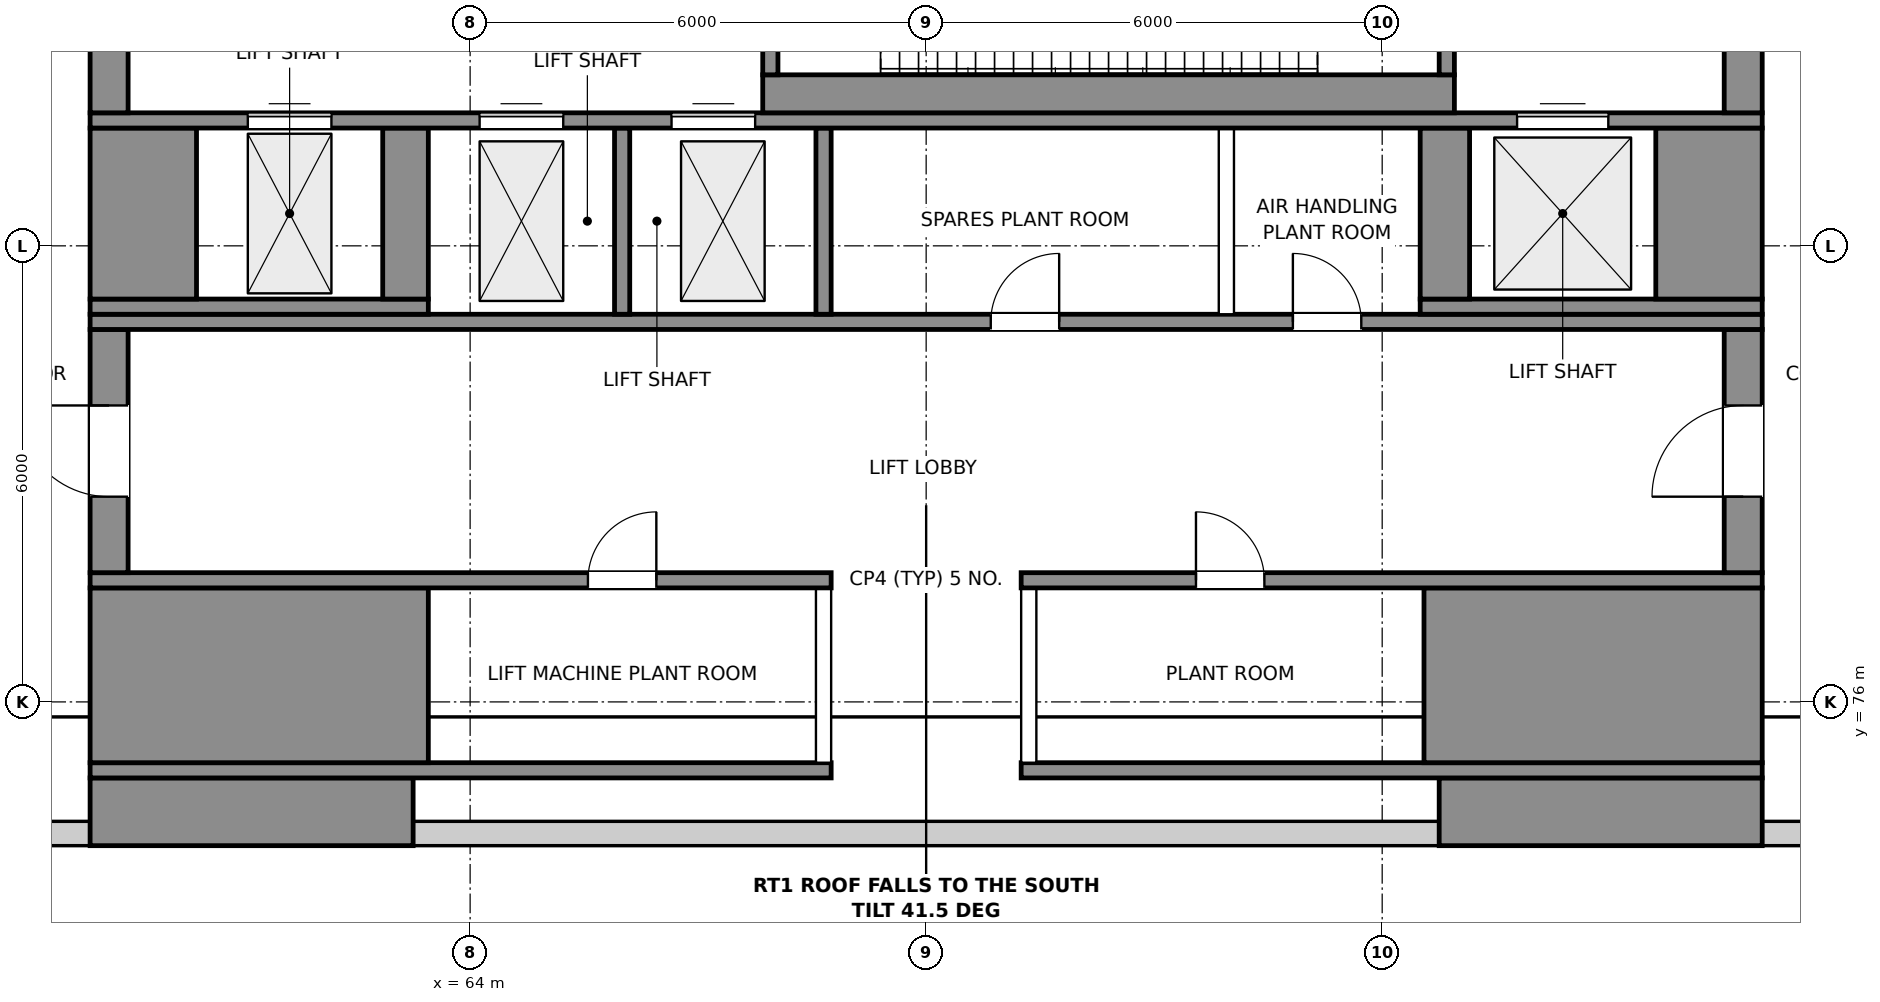
"""IFC4 building model, lengths in metres.
Left out: names, types, materials, properties, quantities, classifications, styles, units other than length and angle.
Written with IfcOpenShell. Run it as: python <this file> out.ifc"""

import sys

from ifc_helpers import new_model, si_unit, direction, frame, frame_2d, origin, place, context, subcontext, project, spatial, polyline, rectangle, outline, extrude, element, fill, save


model = new_model("IFC4")
c1 = context("Model", 3, precision=1e-05, world=origin(), true_north=direction((0.0, 1.0)))
c2 = subcontext(c1, "Body", "Model", "MODEL_VIEW")
j1 = project(units=[si_unit("LENGTHUNIT", "METRE"), si_unit("PLANEANGLEUNIT", "RADIAN")], contexts=[c1])
p1 = place(None, origin())
s1 = spatial("IfcSite", under=j1, at=p1, CompositionType="ELEMENT")
p2 = place(p1, origin())
s2 = spatial("IfcBuilding", under=s1, at=p2, CompositionType="ELEMENT")
p3 = place(p2, frame((0.0, 0.0, 346.7)))
s3 = spatial("IfcBuildingStorey", under=s2, at=p3, CompositionType="ELEMENT", Elevation=346.7)
p4 = place(p3, frame((51.716, 74.269, 0.0), z_axis=(0.0, 0.0, 1.0), x_axis=(1.0, 0.0, 0.0)))
e1 = element("IfcWall", 1, at=p4, inside=s3, PredefinedType="SOLIDWALL", context=c2, shape_type="SweptSolid", body=[
    extrude(rectangle(XDim=7.284, YDim=0.32, at=frame_2d((3.642, 0.0))), origin(), (0.0, 0.0, 1.0), 2.842),
])
p5 = place(p3, frame((63.25, 74.269, 0.0), z_axis=(0.0, 0.0, 1.0), x_axis=(1.0, 0.0, 0.0)))
e2 = element("IfcWall", 2, at=p5, inside=s3, PredefinedType="SOLIDWALL", context=c2, shape_type="SweptSolid", body=[
    extrude(rectangle(XDim=13.5, YDim=0.32, at=frame_2d((6.75, 0.0))), origin(), (0.0, 0.0, 1.0), 2.842),
])
p6 = place(p3, frame((81.0, 74.269, 0.0), z_axis=(0.0, 0.0, 1.0), x_axis=(1.0, 0.0, 0.0)))
e3 = element("IfcWall", 3, at=p6, inside=s3, PredefinedType="SOLIDWALL", context=c2, shape_type="SweptSolid", body=[
    extrude(rectangle(XDim=7.284, YDim=0.32, at=frame_2d((3.642, 0.0))), origin(), (0.0, 0.0, 1.0), 2.842),
])
for number, where, z_axis, x_axis in (
    (4, (59.0, 74.554, 0.0), (0.0, 0.0, 1.0), (1.0, 0.0, 0.0)),
    (5, (76.75, 74.554, 0.0), (0.0, 0.0, 1.0), (1.0, 0.0, 0.0)),
):
    element("IfcWall", number, at=place(p3, frame(where, z_axis=z_axis, x_axis=x_axis)), inside=s3, PredefinedType="SHEAR", context=c2, shape_type="SweptSolid", body=[
        extrude(rectangle(XDim=4.25, YDim=0.891, at=frame_2d((2.125, 0.0))), origin(), (0.0, 0.0, 1.0), 3.045),
    ])
for number, where, z_axis, x_axis in (
    (6, (59.0, 75.1, 0.0), (0.0, 0.0, 1.0), (1.0, 0.0, 0.0)),
    (7, (71.25, 75.1, 0.0), (0.0, 0.0, 1.0), (1.0, 0.0, 0.0)),
):
    element("IfcWall", number, at=place(p3, frame(where, z_axis=z_axis, x_axis=x_axis)), inside=s3, PredefinedType="SHEAR", context=c2, shape_type="SweptSolid", body=[
        extrude(rectangle(XDim=9.75, YDim=0.2, at=frame_2d((4.875, 0.0))), origin(), (0.0, 0.0, 1.0), 3.528),
    ])
p7 = place(p3, frame((59.0, 76.35, 0.0), z_axis=(0.0, 0.0, 1.0), x_axis=(1.0, 0.0, 0.0)))
e8 = element("IfcWall", 8, at=p7, inside=s3, PredefinedType="SHEAR", context=c2, shape_type="SweptSolid", body=[
    extrude(rectangle(XDim=4.45, YDim=2.3, at=frame_2d((2.225, 0.0))), origin(), (0.0, 0.0, 1.0), 4.5),
])
for number, where, z_axis, x_axis in (
    (9, (68.65, 75.2, 0.0), (0.0, 0.0, 1.0), (0.0, 1.0, 0.0)),
    (10, (71.35, 75.2, 0.0), (0.0, 0.0, 1.0), (0.0, 1.0, 0.0)),
):
    element("IfcWall", number, at=place(p3, frame(where, z_axis=z_axis, x_axis=x_axis)), inside=s3, PredefinedType="PARTITIONING", context=c2, shape_type="SweptSolid", body=[
        extrude(outline(polyline([(0.0, 0.0), (2.3, 0.0), (2.3, 4.2), (0.0, 3.516), (0.0, 0.0)])), frame((0.0, 0.1, 0.0), z_axis=(0.0, -1.0, 0.0), x_axis=(1.0, 0.0, 0.0)), (0.0, 0.0, 1.0), 0.2),
    ])
p8 = place(p3, frame((76.55, 76.35, 0.0), z_axis=(0.0, 0.0, 1.0), x_axis=(1.0, 0.0, 0.0)))
e11 = element("IfcWall", 11, at=p8, inside=s3, PredefinedType="SHEAR", context=c2, shape_type="SweptSolid", body=[
    extrude(rectangle(XDim=4.45, YDim=2.3, at=frame_2d((2.225, 0.0))), origin(), (0.0, 0.0, 1.0), 4.5),
])
p9 = place(p3, frame((59.0, 77.6, 0.0), z_axis=(0.0, 0.0, 1.0), x_axis=(1.0, 0.0, 0.0)))
e12 = element("IfcWall", 12, at=p9, inside=s3, PredefinedType="SHEAR", context=c2, shape_type="SweptSolid", body=[
    extrude(rectangle(XDim=9.75, YDim=0.2, at=frame_2d((4.875, 0.0))), origin(), (0.0, 0.0, 1.0), 4.5),
])
p10 = place(p9, frame((6.55, 0.0, 0.0)))
e13 = element("IfcOpeningElement", 13, at=p10, cuts=e12, PredefinedType="OPENING", context=c2, shape_type="SweptSolid", body=[
    extrude(rectangle(XDim=0.9, YDim=2.1, at=frame_2d((0.45, 1.05))), frame((0.0, 0.11, 0.0), z_axis=(0.0, -1.0, 0.0), x_axis=(1.0, 0.0, 0.0)), (0.0, 0.0, 1.0), 0.22),
])
p11 = place(p3, frame((71.25, 77.6, 0.0), z_axis=(0.0, 0.0, 1.0), x_axis=(1.0, 0.0, 0.0)))
e14 = element("IfcWall", 14, at=p11, inside=s3, PredefinedType="SHEAR", context=c2, shape_type="SweptSolid", body=[
    extrude(rectangle(XDim=9.75, YDim=0.2, at=frame_2d((4.875, 0.0))), origin(), (0.0, 0.0, 1.0), 4.5),
])
p12 = place(p11, frame((2.3, 0.0, 0.0)))
e15 = element("IfcOpeningElement", 15, at=p12, cuts=e14, PredefinedType="OPENING", context=c2, shape_type="SweptSolid", body=[
    extrude(rectangle(XDim=0.9, YDim=2.1, at=frame_2d((0.45, 1.05))), frame((0.0, 0.11, 0.0), z_axis=(0.0, -1.0, 0.0), x_axis=(1.0, 0.0, 0.0)), (0.0, 0.0, 1.0), 0.22),
])
p13 = place(p3, frame((59.25, 77.7, 0.0), z_axis=(0.0, 0.0, 1.0), x_axis=(0.0, 1.0, 0.0)))
e16 = element("IfcWall", 16, at=p13, inside=s3, PredefinedType="SHEAR", context=c2, shape_type="SweptSolid", body=[
    extrude(rectangle(XDim=3.2, YDim=0.5, at=frame_2d((1.6, 0.0))), origin(), (0.0, 0.0, 1.0), 4.5),
])
p14 = place(p13, frame((1.0, 0.0, 0.0)))
e17 = element("IfcOpeningElement", 17, at=p14, cuts=e16, PredefinedType="OPENING", context=c2, shape_type="SweptSolid", body=[
    extrude(rectangle(XDim=1.2, YDim=2.1, at=frame_2d((0.6, 1.05))), frame((0.0, 0.26, 0.0), z_axis=(0.0, -1.0, 0.0), x_axis=(1.0, 0.0, 0.0)), (0.0, 0.0, 1.0), 0.52),
])
p15 = place(p3, frame((80.75, 77.7, 0.0), z_axis=(0.0, 0.0, 1.0), x_axis=(0.0, 1.0, 0.0)))
e18 = element("IfcWall", 18, at=p15, inside=s3, PredefinedType="SHEAR", context=c2, shape_type="SweptSolid", body=[
    extrude(rectangle(XDim=3.2, YDim=0.5, at=frame_2d((1.6, 0.0))), origin(), (0.0, 0.0, 1.0), 4.5),
])
p16 = place(p15, frame((1.0, 0.0, 0.0)))
e19 = element("IfcOpeningElement", 19, at=p16, cuts=e18, PredefinedType="OPENING", context=c2, shape_type="SweptSolid", body=[
    extrude(rectangle(XDim=1.2, YDim=2.1, at=frame_2d((0.6, 1.05))), frame((0.0, 0.26, 0.0), z_axis=(0.0, -1.0, 0.0), x_axis=(1.0, 0.0, 0.0)), (0.0, 0.0, 1.0), 0.52),
])
p17 = place(p3, frame((59.0, 81.0, 0.0), z_axis=(0.0, 0.0, 1.0), x_axis=(1.0, 0.0, 0.0)))
e20 = element("IfcWall", 20, at=p17, inside=s3, PredefinedType="SHEAR", context=c2, shape_type="SweptSolid", body=[
    extrude(rectangle(XDim=22.0, YDim=0.2, at=frame_2d((11.0, 0.0))), origin(), (0.0, 0.0, 1.0), 4.5),
])
p18 = place(p17, frame((11.85, 0.0, 0.0)))
e21 = element("IfcOpeningElement", 21, at=p18, cuts=e20, PredefinedType="OPENING", context=c2, shape_type="SweptSolid", body=[
    extrude(rectangle(XDim=0.9, YDim=2.1, at=frame_2d((0.45, 1.05))), frame((0.0, 0.11, 0.0), z_axis=(0.0, -1.0, 0.0), x_axis=(1.0, 0.0, 0.0)), (0.0, 0.0, 1.0), 0.22),
])
p19 = place(p17, frame((15.825, 0.0, 0.0)))
e22 = element("IfcOpeningElement", 22, at=p19, cuts=e20, PredefinedType="OPENING", context=c2, shape_type="SweptSolid", body=[
    extrude(rectangle(XDim=0.9, YDim=2.1, at=frame_2d((0.45, 1.05))), frame((0.0, 0.11, 0.0), z_axis=(0.0, -1.0, 0.0), x_axis=(1.0, 0.0, 0.0)), (0.0, 0.0, 1.0), 0.22),
])
p20 = place(p3, frame((59.0, 81.2, 0.0), z_axis=(0.0, 0.0, 1.0), x_axis=(1.0, 0.0, 0.0)))
e23 = element("IfcWall", 23, at=p20, inside=s3, PredefinedType="SHEAR", context=c2, shape_type="SweptSolid", body=[
    extrude(rectangle(XDim=4.45, YDim=0.2, at=frame_2d((2.225, 0.0))), origin(), (0.0, 0.0, 1.0), 4.5),
])
for number, where, z_axis, x_axis in (
    (24, (66.0, 81.1, 0.0), (0.0, 0.0, 1.0), (0.0, 1.0, 0.0)),
    (25, (68.65, 81.1, 0.0), (0.0, 0.0, 1.0), (0.0, 1.0, 0.0)),
):
    element("IfcWall", number, at=place(p3, frame(where, z_axis=z_axis, x_axis=x_axis)), inside=s3, PredefinedType="SHEAR", context=c2, shape_type="SweptSolid", body=[
        extrude(rectangle(XDim=2.45, YDim=0.2, at=frame_2d((1.225, 0.0))), origin(), (0.0, 0.0, 1.0), 4.5),
    ])
p21 = place(p3, frame((73.95, 81.1, 0.0), z_axis=(0.0, 0.0, 1.0), x_axis=(0.0, 1.0, 0.0)))
e26 = element("IfcWall", 26, at=p21, inside=s3, PredefinedType="PARTITIONING", context=c2, shape_type="SweptSolid", body=[
    extrude(rectangle(XDim=2.45, YDim=0.2, at=frame_2d((1.225, 0.0))), origin(), (0.0, 0.0, 1.0), 4.2),
])
p22 = place(p3, frame((76.5, 81.2, 0.0), z_axis=(0.0, 0.0, 1.0), x_axis=(1.0, 0.0, 0.0)))
e27 = element("IfcWall", 27, at=p22, inside=s3, PredefinedType="SHEAR", context=c2, shape_type="SweptSolid", body=[
    extrude(rectangle(XDim=4.5, YDim=0.2, at=frame_2d((2.25, 0.0))), origin(), (0.0, 0.0, 1.0), 4.5),
])
p23 = place(p3, frame((59.7, 81.3, 0.0), z_axis=(0.0, 0.0, 1.0), x_axis=(0.0, 1.0, 0.0)))
e28 = element("IfcWall", 28, at=p23, inside=s3, PredefinedType="SHEAR", context=c2, shape_type="SweptSolid", body=[
    extrude(rectangle(XDim=2.25, YDim=1.4, at=frame_2d((1.125, 0.0))), origin(), (0.0, 0.0, 1.0), 4.5),
])
p24 = place(p3, frame((63.15, 81.3, 0.0), z_axis=(0.0, 0.0, 1.0), x_axis=(0.0, 1.0, 0.0)))
e29 = element("IfcWall", 29, at=p24, inside=s3, PredefinedType="SHEAR", context=c2, shape_type="SweptSolid", body=[
    extrude(rectangle(XDim=2.25, YDim=0.6, at=frame_2d((1.125, 0.0))), origin(), (0.0, 0.0, 1.0), 4.5),
])
p25 = place(p3, frame((76.825, 81.3, 0.0), z_axis=(0.0, 0.0, 1.0), x_axis=(0.0, 1.0, 0.0)))
e30 = element("IfcWall", 30, at=p25, inside=s3, PredefinedType="SHEAR", context=c2, shape_type="SweptSolid", body=[
    extrude(rectangle(XDim=2.25, YDim=0.65, at=frame_2d((1.125, 0.0))), origin(), (0.0, 0.0, 1.0), 4.5),
])
p26 = place(p3, frame((80.3, 81.3, 0.0), z_axis=(0.0, 0.0, 1.0), x_axis=(0.0, 1.0, 0.0)))
e31 = element("IfcWall", 31, at=p26, inside=s3, PredefinedType="SHEAR", context=c2, shape_type="SweptSolid", body=[
    extrude(rectangle(XDim=2.25, YDim=1.4, at=frame_2d((1.125, 0.0))), origin(), (0.0, 0.0, 1.0), 4.5),
])
p27 = place(p3, frame((59.0, 83.65, 0.0), z_axis=(0.0, 0.0, 1.0), x_axis=(1.0, 0.0, 0.0)))
e32 = element("IfcWall", 32, at=p27, inside=s3, PredefinedType="SHEAR", context=c2, shape_type="SweptSolid", body=[
    extrude(rectangle(XDim=22.0, YDim=0.2, at=frame_2d((11.0, 0.0))), origin(), (0.0, 0.0, 1.0), 4.5),
])
p28 = place(p27, frame((5.125, 0.0, 0.0)))
e33 = element("IfcOpeningElement", 33, at=p28, cuts=e32, PredefinedType="OPENING", context=c2, shape_type="SweptSolid", body=[
    extrude(rectangle(XDim=1.1, YDim=2.1, at=frame_2d((0.55, 1.05))), frame((0.0, 0.11, 0.0), z_axis=(0.0, -1.0, 0.0), x_axis=(1.0, 0.0, 0.0)), (0.0, 0.0, 1.0), 0.22),
])
p29 = place(p27, frame((7.65, 0.0, 0.0)))
e34 = element("IfcOpeningElement", 34, at=p29, cuts=e32, PredefinedType="OPENING", context=c2, shape_type="SweptSolid", body=[
    extrude(rectangle(XDim=1.1, YDim=2.1, at=frame_2d((0.55, 1.05))), frame((0.0, 0.11, 0.0), z_axis=(0.0, -1.0, 0.0), x_axis=(1.0, 0.0, 0.0)), (0.0, 0.0, 1.0), 0.22),
])
p30 = place(p27, frame((18.775, 0.0, 0.0)))
e35 = element("IfcOpeningElement", 35, at=p30, cuts=e32, PredefinedType="OPENING", context=c2, shape_type="SweptSolid", body=[
    extrude(rectangle(XDim=1.2, YDim=2.1, at=frame_2d((0.6, 1.05))), frame((0.0, 0.11, 0.0), z_axis=(0.0, -1.0, 0.0), x_axis=(1.0, 0.0, 0.0)), (0.0, 0.0, 1.0), 0.22),
])
p31 = place(p27, frame((2.075, 0.0, 0.0)))
e36 = element("IfcOpeningElement", 36, at=p31, cuts=e32, PredefinedType="OPENING", context=c2, shape_type="SweptSolid", body=[
    extrude(rectangle(XDim=1.1, YDim=2.1, at=frame_2d((0.55, 1.05))), frame((0.0, 0.11, 0.0), z_axis=(0.0, -1.0, 0.0), x_axis=(1.0, 0.0, 0.0)), (0.0, 0.0, 1.0), 0.22),
])
p32 = place(p3, frame((59.25, 83.75, 0.0), z_axis=(0.0, 0.0, 1.0), x_axis=(0.0, 1.0, 0.0)))
e37 = element("IfcWall", 37, at=p32, inside=s3, PredefinedType="SHEAR", context=c2, shape_type="SweptSolid", body=[
    extrude(rectangle(XDim=3.75, YDim=0.5, at=frame_2d((1.875, 0.0))), origin(), (0.0, 0.0, 1.0), 4.5),
])
p33 = place(p32, frame((1.325, 0.0, 0.0)))
e38 = element("IfcOpeningElement", 38, at=p33, cuts=e37, PredefinedType="OPENING", context=c2, shape_type="SweptSolid", body=[
    extrude(rectangle(XDim=1.1, YDim=2.1, at=frame_2d((0.55, 1.05))), frame((0.0, 0.26, 0.0), z_axis=(0.0, -1.0, 0.0), x_axis=(1.0, 0.0, 0.0)), (0.0, 0.0, 1.0), 0.52),
])
p34 = place(p3, frame((67.85, 84.0, 0.0), z_axis=(0.0, 0.0, 1.0), x_axis=(1.0, 0.0, 0.0)))
e39 = element("IfcWall", 39, at=p34, inside=s3, PredefinedType="SHEAR", context=c2, shape_type="SweptSolid", body=[
    extrude(rectangle(XDim=9.1, YDim=0.5, at=frame_2d((4.55, 0.0))), origin(), (0.0, 0.0, 1.0), 4.5),
])
p35 = place(p3, frame((80.75, 83.75, 0.0), z_axis=(0.0, 0.0, 1.0), x_axis=(0.0, 1.0, 0.0)))
e40 = element("IfcWall", 40, at=p35, inside=s3, PredefinedType="SHEAR", context=c2, shape_type="SweptSolid", body=[
    extrude(rectangle(XDim=1.75, YDim=0.5, at=frame_2d((0.875, 0.0))), origin(), (0.0, 0.0, 1.0), 4.5),
])
p36 = place(p35, frame((0.84, 0.0, 0.0)))
e41 = element("IfcOpeningElement", 41, at=p36, cuts=e40, PredefinedType="OPENING", context=c2, shape_type="SweptSolid", body=[
    extrude(rectangle(XDim=0.9, YDim=2.1, at=frame_2d((0.45, 1.05))), frame((0.0, 0.26, 0.0), z_axis=(0.0, -1.0, 0.0), x_axis=(1.0, 0.0, 0.0)), (0.0, 0.0, 1.0), 0.52),
])
p37 = place(p3, frame((67.95, 84.25, 0.0), z_axis=(0.0, 0.0, 1.0), x_axis=(0.0, 1.0, 0.0)))
e42 = element("IfcWall", 42, at=p37, inside=s3, PredefinedType="SHEAR", context=c2, shape_type="SweptSolid", body=[
    extrude(rectangle(XDim=2.85, YDim=0.2, at=frame_2d((1.425, 0.0))), origin(), (0.0, 0.0, 1.0), 4.5),
])
p38 = place(p37, frame((0.825, 0.0, 0.0)))
e43 = element("IfcOpeningElement", 43, at=p38, cuts=e42, PredefinedType="OPENING", context=c2, shape_type="SweptSolid", body=[
    extrude(rectangle(XDim=1.2, YDim=2.1, at=frame_2d((0.6, 1.05))), frame((0.0, 0.11, 0.0), z_axis=(0.0, -1.0, 0.0), x_axis=(1.0, 0.0, 0.0)), (0.0, 0.0, 1.0), 0.22),
])
p39 = place(p3, frame((76.85, 84.25, 0.0), z_axis=(0.0, 0.0, 1.0), x_axis=(0.0, 1.0, 0.0)))
e44 = element("IfcWall", 44, at=p39, inside=s3, PredefinedType="SHEAR", context=c2, shape_type="SweptSolid", body=[
    extrude(rectangle(XDim=2.85, YDim=0.2, at=frame_2d((1.425, 0.0))), origin(), (0.0, 0.0, 1.0), 4.5),
])
p40 = place(p39, frame((1.575, 0.0, 0.0)))
e45 = element("IfcOpeningElement", 45, at=p40, cuts=e44, PredefinedType="OPENING", context=c2, shape_type="SweptSolid", body=[
    extrude(rectangle(XDim=1.2, YDim=2.1, at=frame_2d((0.6, 1.05))), frame((0.0, 0.11, 0.0), z_axis=(0.0, -1.0, 0.0), x_axis=(1.0, 0.0, 0.0)), (0.0, 0.0, 1.0), 0.22),
])
p41 = place(p14, origin())
e46 = element("IfcDoor", 46, at=p41, inside=s3, OperationType="SINGLE_SWING_RIGHT", PredefinedType="DOOR", context=c2, shape_type="SweptSolid", body=[
    extrude(rectangle(XDim=1.2, YDim=2.1, at=frame_2d((0.6, 1.05))), frame((0.0, 0.025, 0.0), z_axis=(0.0, -1.0, 0.0), x_axis=(1.0, 0.0, 0.0)), (0.0, 0.0, 1.0), 0.05),
])
fill(e17, e46)
p42 = place(p16, origin())
e47 = element("IfcDoor", 47, at=p42, inside=s3, OperationType="SINGLE_SWING_LEFT", PredefinedType="DOOR", context=c2, shape_type="SweptSolid", body=[
    extrude(rectangle(XDim=1.2, YDim=2.1, at=frame_2d((0.6, 1.05))), frame((0.0, 0.025, 0.0), z_axis=(0.0, -1.0, 0.0), x_axis=(1.0, 0.0, 0.0)), (0.0, 0.0, 1.0), 0.05),
])
fill(e19, e47)
p43 = place(p28, origin())
e48 = element("IfcDoor", 48, at=p43, inside=s3, OperationType="DOUBLE_DOOR_SLIDING", PredefinedType="DOOR", context=c2, shape_type="SweptSolid", body=[
    extrude(rectangle(XDim=1.1, YDim=2.1, at=frame_2d((0.55, 1.05))), frame((0.0, 0.025, 0.0), z_axis=(0.0, -1.0, 0.0), x_axis=(1.0, 0.0, 0.0)), (0.0, 0.0, 1.0), 0.05),
])
fill(e33, e48)
p44 = place(p29, origin())
e49 = element("IfcDoor", 49, at=p44, inside=s3, OperationType="DOUBLE_DOOR_SLIDING", PredefinedType="DOOR", context=c2, shape_type="SweptSolid", body=[
    extrude(rectangle(XDim=1.1, YDim=2.1, at=frame_2d((0.55, 1.05))), frame((0.0, 0.025, 0.0), z_axis=(0.0, -1.0, 0.0), x_axis=(1.0, 0.0, 0.0)), (0.0, 0.0, 1.0), 0.05),
])
fill(e34, e49)
p45 = place(p30, origin())
e50 = element("IfcDoor", 50, at=p45, inside=s3, OperationType="DOUBLE_DOOR_SLIDING", PredefinedType="DOOR", context=c2, shape_type="SweptSolid", body=[
    extrude(rectangle(XDim=1.2, YDim=2.1, at=frame_2d((0.6, 1.05))), frame((0.0, 0.025, 0.0), z_axis=(0.0, -1.0, 0.0), x_axis=(1.0, 0.0, 0.0)), (0.0, 0.0, 1.0), 0.05),
])
fill(e35, e50)
p46 = place(p31, origin())
e51 = element("IfcDoor", 51, at=p46, inside=s3, OperationType="DOUBLE_DOOR_SLIDING", PredefinedType="DOOR", context=c2, shape_type="SweptSolid", body=[
    extrude(rectangle(XDim=1.1, YDim=2.1, at=frame_2d((0.55, 1.05))), frame((0.0, 0.025, 0.0), z_axis=(0.0, -1.0, 0.0), x_axis=(1.0, 0.0, 0.0)), (0.0, 0.0, 1.0), 0.05),
])
fill(e36, e51)
p47 = place(p10, origin())
e52 = element("IfcDoor", 52, at=p47, inside=s3, OperationType="SINGLE_SWING_RIGHT", PredefinedType="DOOR", context=c2, shape_type="SweptSolid", body=[
    extrude(rectangle(XDim=0.9, YDim=2.1, at=frame_2d((0.45, 1.05))), frame((0.0, 0.025, 0.0), z_axis=(0.0, -1.0, 0.0), x_axis=(1.0, 0.0, 0.0)), (0.0, 0.0, 1.0), 0.05),
])
fill(e13, e52)
p48 = place(p12, origin())
e53 = element("IfcDoor", 53, at=p48, inside=s3, OperationType="SINGLE_SWING_LEFT", PredefinedType="DOOR", context=c2, shape_type="SweptSolid", body=[
    extrude(rectangle(XDim=0.9, YDim=2.1, at=frame_2d((0.45, 1.05))), frame((0.0, 0.025, 0.0), z_axis=(0.0, -1.0, 0.0), x_axis=(1.0, 0.0, 0.0)), (0.0, 0.0, 1.0), 0.05),
])
fill(e15, e53)
p49 = place(p18, origin())
e54 = element("IfcDoor", 54, at=p49, inside=s3, OperationType="SINGLE_SWING_RIGHT", PredefinedType="DOOR", context=c2, shape_type="SweptSolid", body=[
    extrude(rectangle(XDim=0.9, YDim=2.1, at=frame_2d((0.45, 1.05))), frame((0.0, 0.025, 0.0), z_axis=(0.0, -1.0, 0.0), x_axis=(1.0, 0.0, 0.0)), (0.0, 0.0, 1.0), 0.05),
])
fill(e21, e54)
p50 = place(p19, origin())
e55 = element("IfcDoor", 55, at=p50, inside=s3, OperationType="SINGLE_SWING_LEFT", PredefinedType="DOOR", context=c2, shape_type="SweptSolid", body=[
    extrude(rectangle(XDim=0.9, YDim=2.1, at=frame_2d((0.45, 1.05))), frame((0.0, 0.025, 0.0), z_axis=(0.0, -1.0, 0.0), x_axis=(1.0, 0.0, 0.0)), (0.0, 0.0, 1.0), 0.05),
])
fill(e22, e55)
save(model, sys.argv[1])
